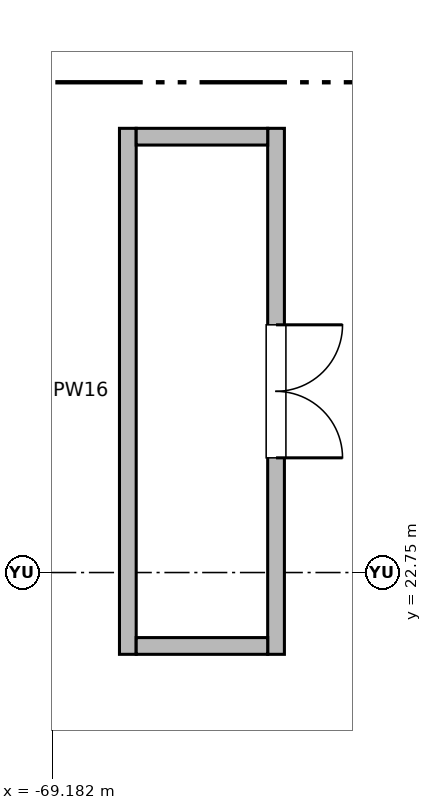
"""IFC4 building model, lengths in metres.
Left out: names, types, materials, properties, quantities, classifications, styles, units other than length and angle.
Written with IfcOpenShell. Run it as: python <this file> out.ifc"""

import sys

from ifc_helpers import new_model, si_unit, direction, frame, frame_2d, origin, place, context, subcontext, project, spatial, rectangle, extrude, element, fill, save


model = new_model("IFC4")
c1 = context("Model", 3, precision=1e-05, world=origin(), true_north=direction((0.0, 1.0)))
c2 = subcontext(c1, "Body", "Model", "MODEL_VIEW")
j1 = project(units=[si_unit("LENGTHUNIT", "METRE"), si_unit("PLANEANGLEUNIT", "RADIAN")], contexts=[c1])
p1 = place(None, origin())
s1 = spatial("IfcSite", under=j1, at=p1, CompositionType="ELEMENT")
p2 = place(p1, origin())
s2 = spatial("IfcBuilding", under=s1, at=p2, CompositionType="ELEMENT")
p3 = place(p2, frame((0.0, 0.0, 16.2)))
s3 = spatial("IfcBuildingStorey", under=s2, at=p3, CompositionType="ELEMENT", Elevation=16.2)
p4 = place(p3, frame((-66.236, 28.594, 0.0), z_axis=(0.0, 0.0, 1.0), x_axis=(0.0, -1.0, 0.0)))
e1 = element("IfcWall", 1, at=p4, inside=s3, PredefinedType="PARTITIONING", context=c2, shape_type="SweptSolid", body=[
    extrude(rectangle(XDim=6.92, YDim=0.22, at=frame_2d((3.46, 0.0))), origin(), (0.0, 0.0, 1.0), 3.82),
])
p5 = place(p4, frame((2.585, 0.0, 0.0)))
e2 = element("IfcOpeningElement", 2, at=p5, cuts=e1, PredefinedType="OPENING", context=c2, shape_type="SweptSolid", body=[
    extrude(rectangle(XDim=1.75, YDim=2.35, at=frame_2d((0.875, 1.175))), frame((0.0, 0.12, 0.0), z_axis=(0.0, -1.0, 0.0), x_axis=(1.0, 0.0, 0.0)), (0.0, 0.0, 1.0), 0.24),
])
p6 = place(p3, frame((-68.186, 21.674, 0.0), z_axis=(0.0, 0.0, 1.0), x_axis=(0.0, 1.0, 0.0)))
e3 = element("IfcWall", 3, at=p6, inside=s3, PredefinedType="PARTITIONING", context=c2, shape_type="SweptSolid", body=[
    extrude(rectangle(XDim=6.92, YDim=0.22, at=frame_2d((3.46, 0.0))), origin(), (0.0, 0.0, 1.0), 3.82),
])
for number, where, z_axis, x_axis in (
    (4, (-68.076, 21.784, 0.0), (0.0, 0.0, 1.0), (1.0, 0.0, 0.0)),
    (5, (-68.076, 28.484, 0.0), (0.0, 0.0, 1.0), (1.0, 0.0, 0.0)),
):
    element("IfcWall", number, at=place(p3, frame(where, z_axis=z_axis, x_axis=x_axis)), inside=s3, PredefinedType="PARTITIONING", context=c2, shape_type="SweptSolid", body=[
        extrude(rectangle(XDim=1.73, YDim=0.22, at=frame_2d((0.865, 0.0))), origin(), (0.0, 0.0, 1.0), 3.82),
    ])
p7 = place(p5, origin())
e6 = element("IfcDoor", 6, at=p7, inside=s3, OperationType="DOUBLE_DOOR_SINGLE_SWING", PredefinedType="DOOR", context=c2, shape_type="SweptSolid", body=[
    extrude(rectangle(XDim=1.75, YDim=2.35, at=frame_2d((0.875, 1.175))), frame((0.0, 0.025, 0.0), z_axis=(0.0, -1.0, 0.0), x_axis=(1.0, 0.0, 0.0)), (0.0, 0.0, 1.0), 0.05),
])
fill(e2, e6)
save(model, sys.argv[1])
